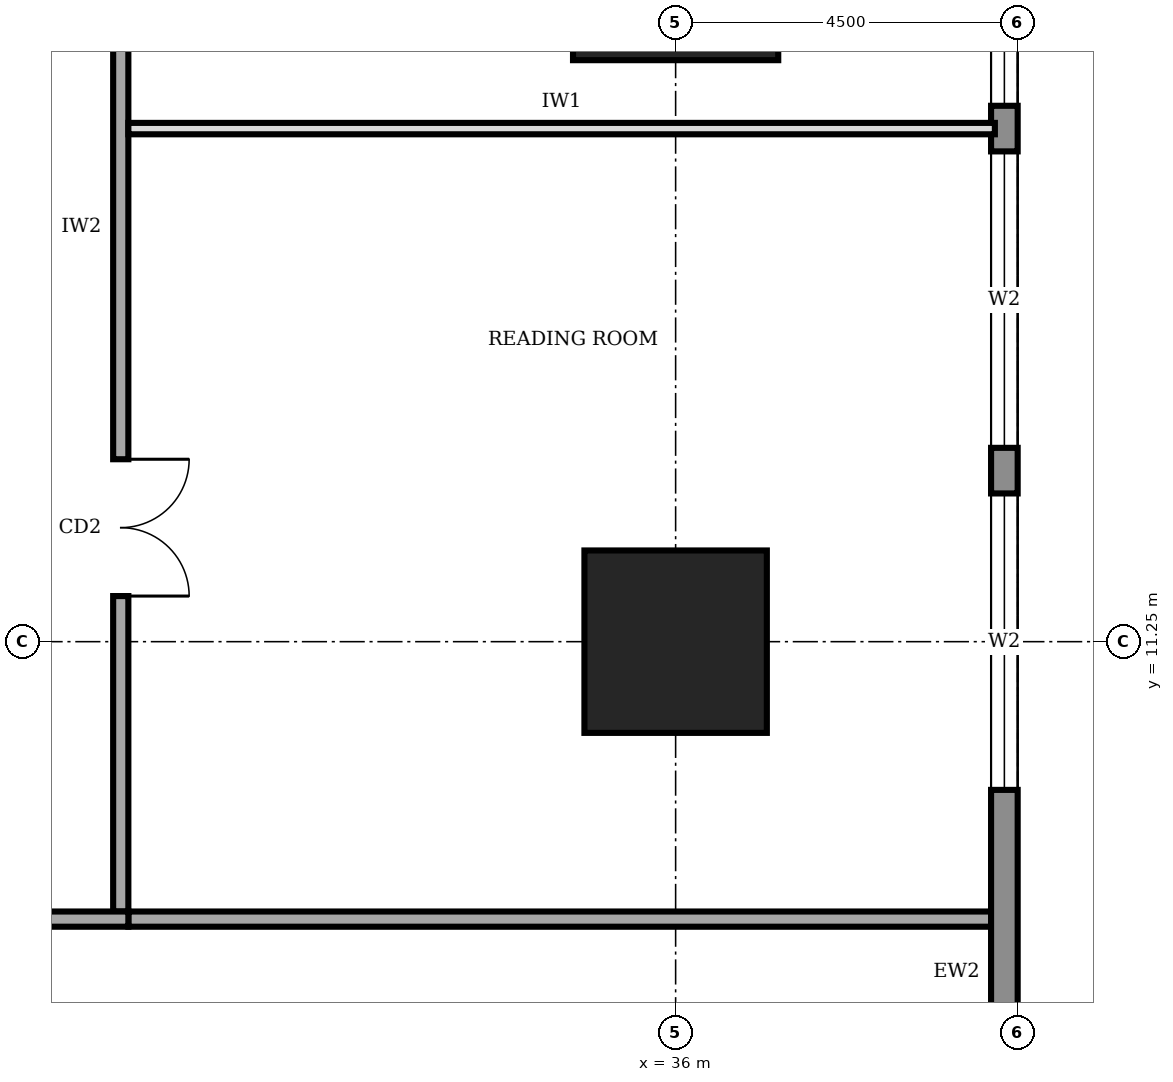
"""IFC4 building model, lengths in metres.
Left out: names, types, materials, properties, quantities, classifications, styles, units other than length and angle.
Written with IfcOpenShell. Run it as: python <this file> out.ifc"""

import sys

from ifc_helpers import new_model, si_unit, direction, frame, frame_2d, origin, origin_2d, place, context, subcontext, project, spatial, rectangle, extrude, element, fill, save


model = new_model("IFC4")
c1 = context("Model", 3, precision=1e-05, world=origin(), true_north=direction((0.0, 1.0)))
c2 = subcontext(c1, "Body", "Model", "MODEL_VIEW")
j1 = project(units=[si_unit("LENGTHUNIT", "METRE"), si_unit("PLANEANGLEUNIT", "RADIAN")], contexts=[c1])
p1 = place(None, origin())
s1 = spatial("IfcSite", under=j1, at=p1, CompositionType="ELEMENT")
p2 = place(p1, origin())
s2 = spatial("IfcBuilding", under=s1, at=p2, CompositionType="ELEMENT")
p3 = place(p2, frame((0.0, 0.0, 73.0)))
s3 = spatial("IfcBuildingStorey", under=s2, at=p3, CompositionType="ELEMENT", Elevation=73.0)
p4 = place(p3, frame((36.0, 11.25, 0.0), z_axis=(0.0, 0.0, 1.0), x_axis=(1.0, 0.0, 0.0)))
e1 = element("IfcColumn", 1, at=p4, inside=s3, PredefinedType="COLUMN", context=c2, shape_type="SweptSolid", body=[
    extrude(rectangle(XDim=2.4, YDim=2.4, at=origin_2d()), origin(), (0.0, 0.0, 1.0), 4.0),
])
p5 = place(p3, frame((36.0, 20.25, 0.0), z_axis=(0.0, 0.0, 1.0), x_axis=(1.0, 0.0, 0.0)))
e2 = element("IfcColumn", 2, at=p5, inside=s3, PredefinedType="COLUMN", context=c2, shape_type="SweptSolid", body=[
    extrude(rectangle(XDim=2.7, YDim=2.7, at=origin_2d()), origin(), (0.0, 0.0, 1.0), 4.0),
])
p6 = place(p3, frame((40.325, 4.52, 0.0), z_axis=(0.0, 0.0, 1.0), x_axis=(0.0, 1.0, 0.0)))
e3 = element("IfcWall", 3, at=p6, inside=s3, PredefinedType="STANDARD", context=c2, shape_type="SweptSolid", body=[
    extrude(rectangle(XDim=31.46, YDim=0.35, at=frame_2d((15.73, 0.0))), origin(), (0.0, 0.0, 1.0), 3.75),
])
p7 = place(p6, frame((4.78, 0.0, 0.6)))
e4 = element("IfcOpeningElement", 4, at=p7, cuts=e3, PredefinedType="OPENING", context=c2, shape_type="SweptSolid", body=[
    extrude(rectangle(XDim=3.9, YDim=2.6, at=frame_2d((1.95, 1.3))), frame((0.0, 0.185, 0.0), z_axis=(0.0, -1.0, 0.0), x_axis=(1.0, 0.0, 0.0)), (0.0, 0.0, 1.0), 0.37),
])
p8 = place(p6, frame((9.28, 0.0, 0.6)))
e5 = element("IfcOpeningElement", 5, at=p8, cuts=e3, PredefinedType="OPENING", context=c2, shape_type="SweptSolid", body=[
    extrude(rectangle(XDim=3.9, YDim=2.6, at=frame_2d((1.95, 1.3))), frame((0.0, 0.185, 0.0), z_axis=(0.0, -1.0, 0.0), x_axis=(1.0, 0.0, 0.0)), (0.0, 0.0, 1.0), 0.37),
])
p9 = place(p6, frame((13.78, 0.0, 0.6)))
e6 = element("IfcOpeningElement", 6, at=p9, cuts=e3, PredefinedType="OPENING", context=c2, shape_type="SweptSolid", body=[
    extrude(rectangle(XDim=3.9, YDim=2.6, at=frame_2d((1.95, 1.3))), frame((0.0, 0.185, 0.0), z_axis=(0.0, -1.0, 0.0), x_axis=(1.0, 0.0, 0.0)), (0.0, 0.0, 1.0), 0.37),
])
p10 = place(p6, frame((18.28, 0.0, 0.6)))
e7 = element("IfcOpeningElement", 7, at=p10, cuts=e3, PredefinedType="OPENING", context=c2, shape_type="SweptSolid", body=[
    extrude(rectangle(XDim=3.9, YDim=2.6, at=frame_2d((1.95, 1.3))), frame((0.0, 0.185, 0.0), z_axis=(0.0, -1.0, 0.0), x_axis=(1.0, 0.0, 0.0)), (0.0, 0.0, 1.0), 0.37),
])
p11 = place(p6, frame((22.78, 0.0, 0.6)))
e8 = element("IfcOpeningElement", 8, at=p11, cuts=e3, PredefinedType="OPENING", context=c2, shape_type="SweptSolid", body=[
    extrude(rectangle(XDim=3.9, YDim=2.6, at=frame_2d((1.95, 1.3))), frame((0.0, 0.185, 0.0), z_axis=(0.0, -1.0, 0.0), x_axis=(1.0, 0.0, 0.0)), (0.0, 0.0, 1.0), 0.37),
])
p12 = place(p6, frame((27.21, 0.0, 0.6)))
e9 = element("IfcOpeningElement", 9, at=p12, cuts=e3, PredefinedType="OPENING", context=c2, shape_type="SweptSolid", body=[
    extrude(rectangle(XDim=3.9, YDim=2.6, at=frame_2d((1.95, 1.3))), frame((0.0, 0.185, 0.0), z_axis=(0.0, -1.0, 0.0), x_axis=(1.0, 0.0, 0.0)), (0.0, 0.0, 1.0), 0.37),
])
p13 = place(p3, frame((11.9, 7.6, 0.0), z_axis=(0.0, 0.0, 1.0), x_axis=(1.0, 0.0, 0.0)))
e10 = element("IfcWall", 10, at=p13, inside=s3, PredefinedType="SOLIDWALL", context=c2, shape_type="SweptSolid", body=[
    extrude(rectangle(XDim=16.9, YDim=0.2, at=frame_2d((8.45, 0.0))), origin(), (0.0, 0.0, 1.0), 3.75),
])
p14 = place(p13, frame((0.275, 0.0, 0.0)))
e11 = element("IfcOpeningElement", 11, at=p14, cuts=e10, PredefinedType="OPENING", context=c2, shape_type="SweptSolid", body=[
    extrude(rectangle(XDim=1.0, YDim=2.1, at=frame_2d((0.5, 1.05))), frame((0.0, 0.11, 0.0), z_axis=(0.0, -1.0, 0.0), x_axis=(1.0, 0.0, 0.0)), (0.0, 0.0, 1.0), 0.22),
])
p15 = place(p13, frame((5.6, 0.0, 0.0)))
e12 = element("IfcOpeningElement", 12, at=p15, cuts=e10, PredefinedType="OPENING", context=c2, shape_type="SweptSolid", body=[
    extrude(rectangle(XDim=1.0, YDim=2.1, at=frame_2d((0.5, 1.05))), frame((0.0, 0.11, 0.0), z_axis=(0.0, -1.0, 0.0), x_axis=(1.0, 0.0, 0.0)), (0.0, 0.0, 1.0), 0.22),
])
p16 = place(p13, frame((12.85, 0.0, 0.0)))
e13 = element("IfcOpeningElement", 13, at=p16, cuts=e10, PredefinedType="OPENING", context=c2, shape_type="SweptSolid", body=[
    extrude(rectangle(XDim=1.8, YDim=2.1, at=frame_2d((0.9, 1.05))), frame((0.0, 0.11, 0.0), z_axis=(0.0, -1.0, 0.0), x_axis=(1.0, 0.0, 0.0)), (0.0, 0.0, 1.0), 0.22),
])
p17 = place(p3, frame((28.7, 7.7, 0.0), z_axis=(0.0, 0.0, 1.0), x_axis=(0.0, 1.0, 0.0)))
e14 = element("IfcWall", 14, at=p17, inside=s3, PredefinedType="SOLIDWALL", context=c2, shape_type="SweptSolid", body=[
    extrude(rectangle(XDim=25.3, YDim=0.2, at=frame_2d((12.65, 0.0))), origin(), (0.0, 0.0, 1.0), 3.75),
])
p18 = place(p17, frame((4.15, 0.0, 0.0)))
e15 = element("IfcOpeningElement", 15, at=p18, cuts=e14, PredefinedType="OPENING", context=c2, shape_type="SweptSolid", body=[
    extrude(rectangle(XDim=1.8, YDim=2.1, at=frame_2d((0.9, 1.05))), frame((0.0, 0.11, 0.0), z_axis=(0.0, -1.0, 0.0), x_axis=(1.0, 0.0, 0.0)), (0.0, 0.0, 1.0), 0.22),
])
p19 = place(p17, frame((12.05, 0.0, 0.0)))
e16 = element("IfcOpeningElement", 16, at=p19, cuts=e14, PredefinedType="OPENING", context=c2, shape_type="SweptSolid", body=[
    extrude(rectangle(XDim=1.0, YDim=2.1, at=frame_2d((0.5, 1.05))), frame((0.0, 0.11, 0.0), z_axis=(0.0, -1.0, 0.0), x_axis=(1.0, 0.0, 0.0)), (0.0, 0.0, 1.0), 0.22),
])
p20 = place(p17, frame((19.15, 0.0, 0.0)))
e17 = element("IfcOpeningElement", 17, at=p20, cuts=e14, PredefinedType="OPENING", context=c2, shape_type="SweptSolid", body=[
    extrude(rectangle(XDim=1.8, YDim=2.1, at=frame_2d((0.9, 1.05))), frame((0.0, 0.11, 0.0), z_axis=(0.0, -1.0, 0.0), x_axis=(1.0, 0.0, 0.0)), (0.0, 0.0, 1.0), 0.22),
])
p21 = place(p3, frame((28.8, 7.6, 0.0), z_axis=(0.0, 0.0, 1.0), x_axis=(1.0, 0.0, 0.0)))
e18 = element("IfcWall", 18, at=p21, inside=s3, PredefinedType="SOLIDWALL", context=c2, shape_type="SweptSolid", body=[
    extrude(rectangle(XDim=11.4, YDim=0.2, at=frame_2d((5.7, 0.0))), origin(), (0.0, 0.0, 1.0), 3.75),
])
p22 = place(p3, frame((28.8, 18.0, 0.0), z_axis=(0.0, 0.0, 1.0), x_axis=(1.0, 0.0, 0.0)))
e19 = element("IfcWall", 19, at=p22, inside=s3, PredefinedType="PARTITIONING", context=c2, shape_type="SweptSolid", body=[
    extrude(rectangle(XDim=11.4, YDim=0.15, at=frame_2d((5.7, 0.0))), origin(), (0.0, 0.0, 1.0), 3.75),
])
p23 = place(p7, origin())
e20 = element("IfcWindow", 20, at=p23, inside=s3, PartitioningType="SINGLE_PANEL", PredefinedType="WINDOW", context=c2, shape_type="SweptSolid", body=[
    extrude(rectangle(XDim=3.9, YDim=2.6, at=frame_2d((1.95, 1.3))), frame((0.0, 0.03, 0.0), z_axis=(0.0, -1.0, 0.0), x_axis=(1.0, 0.0, 0.0)), (0.0, 0.0, 1.0), 0.06),
])
fill(e4, e20)
p24 = place(p8, origin())
e21 = element("IfcWindow", 21, at=p24, inside=s3, PartitioningType="SINGLE_PANEL", PredefinedType="WINDOW", context=c2, shape_type="SweptSolid", body=[
    extrude(rectangle(XDim=3.9, YDim=2.6, at=frame_2d((1.95, 1.3))), frame((0.0, 0.03, 0.0), z_axis=(0.0, -1.0, 0.0), x_axis=(1.0, 0.0, 0.0)), (0.0, 0.0, 1.0), 0.06),
])
fill(e5, e21)
p25 = place(p9, origin())
e22 = element("IfcWindow", 22, at=p25, inside=s3, PartitioningType="SINGLE_PANEL", PredefinedType="WINDOW", context=c2, shape_type="SweptSolid", body=[
    extrude(rectangle(XDim=3.9, YDim=2.6, at=frame_2d((1.95, 1.3))), frame((0.0, 0.03, 0.0), z_axis=(0.0, -1.0, 0.0), x_axis=(1.0, 0.0, 0.0)), (0.0, 0.0, 1.0), 0.06),
])
fill(e6, e22)
p26 = place(p18, frame((1.8, 0.0, 0.0), z_axis=(0.0, 0.0, 1.0), x_axis=(-1.0, 0.0, 0.0)))
e23 = element("IfcDoor", 23, at=p26, inside=s3, OperationType="DOUBLE_DOOR_SINGLE_SWING", PredefinedType="DOOR", context=c2, shape_type="SweptSolid", body=[
    extrude(rectangle(XDim=1.8, YDim=2.1, at=frame_2d((0.9, 1.05))), frame((0.0, 0.025, 0.0), z_axis=(0.0, -1.0, 0.0), x_axis=(1.0, 0.0, 0.0)), (0.0, 0.0, 1.0), 0.05),
])
fill(e15, e23)
save(model, sys.argv[1])
